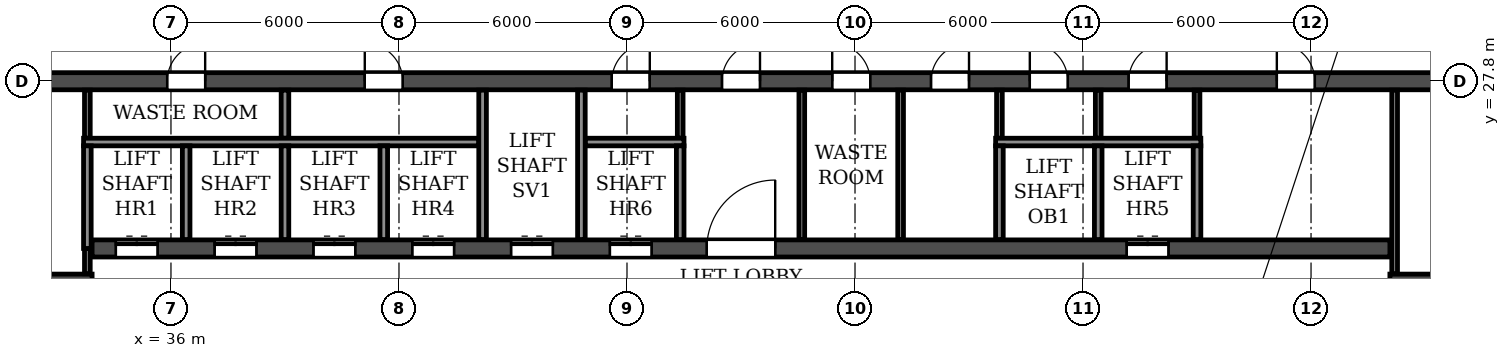
"""IFC4 building model, lengths in metres.
Left out: names, types, materials, properties, quantities, classifications, styles, units other than length and angle.
Written with IfcOpenShell. Run it as: python <this file> out.ifc"""

import sys

from ifc_helpers import new_model, si_unit, direction, frame, frame_2d, origin, place, context, subcontext, project, spatial, rectangle, extrude, element, fill, save


model = new_model("IFC4")
c1 = context("Model", 3, precision=1e-05, world=origin(), true_north=direction((0.0, 1.0)))
c2 = subcontext(c1, "Body", "Model", "MODEL_VIEW")
j1 = project(units=[si_unit("LENGTHUNIT", "METRE"), si_unit("PLANEANGLEUNIT", "RADIAN")], contexts=[c1])
p1 = place(None, origin())
s1 = spatial("IfcSite", under=j1, at=p1, CompositionType="ELEMENT")
p2 = place(p1, origin())
s2 = spatial("IfcBuilding", under=s1, at=p2, CompositionType="ELEMENT")
p3 = place(p2, frame((0.0, 0.0, 142.2)))
s3 = spatial("IfcBuildingStorey", under=s2, at=p3, CompositionType="ELEMENT", Elevation=142.2)
p4 = place(p3, frame((12.2, 27.8, 0.0), z_axis=(0.0, 0.0, 1.0), x_axis=(1.0, 0.0, 0.0)))
e1 = element("IfcWall", 1, at=p4, inside=s3, PredefinedType="SOLIDWALL", context=c2, shape_type="SweptSolid", body=[
    extrude(rectangle(XDim=77.6, YDim=0.45, at=frame_2d((38.8, 0.0))), origin(), (0.0, 0.0, 1.0), 3.07),
])
p5 = place(p4, frame((2.3, 0.0, 0.0)))
e2 = element("IfcOpeningElement", 2, at=p5, cuts=e1, PredefinedType="OPENING", context=c2, shape_type="SweptSolid", body=[
    extrude(rectangle(XDim=1.0, YDim=2.1, at=frame_2d((0.5, 1.05))), frame((0.0, 0.235, 0.0), z_axis=(0.0, -1.0, 0.0), x_axis=(1.0, 0.0, 0.0)), (0.0, 0.0, 1.0), 0.47),
])
p6 = place(p4, frame((6.7, 0.0, 0.0)))
e3 = element("IfcOpeningElement", 3, at=p6, cuts=e1, PredefinedType="OPENING", context=c2, shape_type="SweptSolid", body=[
    extrude(rectangle(XDim=1.0, YDim=2.1, at=frame_2d((0.5, 1.05))), frame((0.0, 0.235, 0.0), z_axis=(0.0, -1.0, 0.0), x_axis=(1.0, 0.0, 0.0)), (0.0, 0.0, 1.0), 0.47),
])
p7 = place(p4, frame((10.05, 0.0, 0.0)))
e4 = element("IfcOpeningElement", 4, at=p7, cuts=e1, PredefinedType="OPENING", context=c2, shape_type="SweptSolid", body=[
    extrude(rectangle(XDim=0.9, YDim=2.1, at=frame_2d((0.45, 1.05))), frame((0.0, 0.235, 0.0), z_axis=(0.0, -1.0, 0.0), x_axis=(1.0, 0.0, 0.0)), (0.0, 0.0, 1.0), 0.47),
])
p8 = place(p4, frame((19.25, 0.0, 0.0)))
e5 = element("IfcOpeningElement", 5, at=p8, cuts=e1, PredefinedType="OPENING", context=c2, shape_type="SweptSolid", body=[
    extrude(rectangle(XDim=0.9, YDim=2.1, at=frame_2d((0.45, 1.05))), frame((0.0, 0.235, 0.0), z_axis=(0.0, -1.0, 0.0), x_axis=(1.0, 0.0, 0.0)), (0.0, 0.0, 1.0), 0.47),
])
p9 = place(p4, frame((23.7, 0.0, 0.0)))
e6 = element("IfcOpeningElement", 6, at=p9, cuts=e1, PredefinedType="OPENING", context=c2, shape_type="SweptSolid", body=[
    extrude(rectangle(XDim=1.0, YDim=2.1, at=frame_2d((0.5, 1.05))), frame((0.0, 0.235, 0.0), z_axis=(0.0, -1.0, 0.0), x_axis=(1.0, 0.0, 0.0)), (0.0, 0.0, 1.0), 0.47),
])
p10 = place(p4, frame((28.9, 0.0, 0.0)))
e7 = element("IfcOpeningElement", 7, at=p10, cuts=e1, PredefinedType="OPENING", context=c2, shape_type="SweptSolid", body=[
    extrude(rectangle(XDim=1.0, YDim=2.1, at=frame_2d((0.5, 1.05))), frame((0.0, 0.235, 0.0), z_axis=(0.0, -1.0, 0.0), x_axis=(1.0, 0.0, 0.0)), (0.0, 0.0, 1.0), 0.47),
])
p11 = place(p4, frame((35.4, 0.0, 0.0)))
e8 = element("IfcOpeningElement", 8, at=p11, cuts=e1, PredefinedType="OPENING", context=c2, shape_type="SweptSolid", body=[
    extrude(rectangle(XDim=1.0, YDim=2.1, at=frame_2d((0.5, 1.05))), frame((0.0, 0.235, 0.0), z_axis=(0.0, -1.0, 0.0), x_axis=(1.0, 0.0, 0.0)), (0.0, 0.0, 1.0), 0.47),
])
p12 = place(p4, frame((38.3, 0.0, 0.0)))
e9 = element("IfcOpeningElement", 9, at=p12, cuts=e1, PredefinedType="OPENING", context=c2, shape_type="SweptSolid", body=[
    extrude(rectangle(XDim=1.0, YDim=2.1, at=frame_2d((0.5, 1.05))), frame((0.0, 0.235, 0.0), z_axis=(0.0, -1.0, 0.0), x_axis=(1.0, 0.0, 0.0)), (0.0, 0.0, 1.0), 0.47),
])
p13 = place(p4, frame((41.2, 0.0, 0.0)))
e10 = element("IfcOpeningElement", 10, at=p13, cuts=e1, PredefinedType="OPENING", context=c2, shape_type="SweptSolid", body=[
    extrude(rectangle(XDim=1.0, YDim=2.1, at=frame_2d((0.5, 1.05))), frame((0.0, 0.235, 0.0), z_axis=(0.0, -1.0, 0.0), x_axis=(1.0, 0.0, 0.0)), (0.0, 0.0, 1.0), 0.47),
])
p14 = place(p4, frame((43.8, 0.0, 0.0)))
e11 = element("IfcOpeningElement", 11, at=p14, cuts=e1, PredefinedType="OPENING", context=c2, shape_type="SweptSolid", body=[
    extrude(rectangle(XDim=1.0, YDim=2.1, at=frame_2d((0.5, 1.05))), frame((0.0, 0.235, 0.0), z_axis=(0.0, -1.0, 0.0), x_axis=(1.0, 0.0, 0.0)), (0.0, 0.0, 1.0), 0.47),
])
p15 = place(p4, frame((46.4, 0.0, 0.0)))
e12 = element("IfcOpeningElement", 12, at=p15, cuts=e1, PredefinedType="OPENING", context=c2, shape_type="SweptSolid", body=[
    extrude(rectangle(XDim=1.0, YDim=2.1, at=frame_2d((0.5, 1.05))), frame((0.0, 0.235, 0.0), z_axis=(0.0, -1.0, 0.0), x_axis=(1.0, 0.0, 0.0)), (0.0, 0.0, 1.0), 0.47),
])
p16 = place(p4, frame((49.0, 0.0, 0.0)))
e13 = element("IfcOpeningElement", 13, at=p16, cuts=e1, PredefinedType="OPENING", context=c2, shape_type="SweptSolid", body=[
    extrude(rectangle(XDim=1.0, YDim=2.1, at=frame_2d((0.5, 1.05))), frame((0.0, 0.235, 0.0), z_axis=(0.0, -1.0, 0.0), x_axis=(1.0, 0.0, 0.0)), (0.0, 0.0, 1.0), 0.47),
])
p17 = place(p4, frame((52.9, 0.0, 0.0)))
e14 = element("IfcOpeningElement", 14, at=p17, cuts=e1, PredefinedType="OPENING", context=c2, shape_type="SweptSolid", body=[
    extrude(rectangle(XDim=1.0, YDim=2.1, at=frame_2d((0.5, 1.05))), frame((0.0, 0.235, 0.0), z_axis=(0.0, -1.0, 0.0), x_axis=(1.0, 0.0, 0.0)), (0.0, 0.0, 1.0), 0.47),
])
p18 = place(p4, frame((57.45, 0.0, 0.0)))
e15 = element("IfcOpeningElement", 15, at=p18, cuts=e1, PredefinedType="OPENING", context=c2, shape_type="SweptSolid", body=[
    extrude(rectangle(XDim=0.9, YDim=2.1, at=frame_2d((0.45, 1.05))), frame((0.0, 0.235, 0.0), z_axis=(0.0, -1.0, 0.0), x_axis=(1.0, 0.0, 0.0)), (0.0, 0.0, 1.0), 0.47),
])
p19 = place(p4, frame((66.65, 0.0, 0.0)))
e16 = element("IfcOpeningElement", 16, at=p19, cuts=e1, PredefinedType="OPENING", context=c2, shape_type="SweptSolid", body=[
    extrude(rectangle(XDim=0.9, YDim=2.1, at=frame_2d((0.45, 1.05))), frame((0.0, 0.235, 0.0), z_axis=(0.0, -1.0, 0.0), x_axis=(1.0, 0.0, 0.0)), (0.0, 0.0, 1.0), 0.47),
])
p20 = place(p4, frame((69.9, 0.0, 0.0)))
e17 = element("IfcOpeningElement", 17, at=p20, cuts=e1, PredefinedType="OPENING", context=c2, shape_type="SweptSolid", body=[
    extrude(rectangle(XDim=1.0, YDim=2.1, at=frame_2d((0.5, 1.05))), frame((0.0, 0.235, 0.0), z_axis=(0.0, -1.0, 0.0), x_axis=(1.0, 0.0, 0.0)), (0.0, 0.0, 1.0), 0.47),
])
p21 = place(p4, frame((74.3, 0.0, 0.0)))
e18 = element("IfcOpeningElement", 18, at=p21, cuts=e1, PredefinedType="OPENING", context=c2, shape_type="SweptSolid", body=[
    extrude(rectangle(XDim=1.0, YDim=2.1, at=frame_2d((0.5, 1.05))), frame((0.0, 0.235, 0.0), z_axis=(0.0, -1.0, 0.0), x_axis=(1.0, 0.0, 0.0)), (0.0, 0.0, 1.0), 0.47),
])
p22 = place(p3, frame((33.925, 23.4, 0.0), z_axis=(0.0, 0.0, 1.0), x_axis=(1.0, 0.0, 0.0)))
e19 = element("IfcWall", 19, at=p22, inside=s3, PredefinedType="SOLIDWALL", context=c2, shape_type="SweptSolid", body=[
    extrude(rectangle(XDim=34.15, YDim=0.45, at=frame_2d((17.075, 0.0))), origin(), (0.0, 0.0, 1.0), 3.07),
])
p23 = place(p22, frame((16.175, 0.0, 0.0)))
e20 = element("IfcOpeningElement", 20, at=p23, cuts=e19, PredefinedType="OPENING", context=c2, shape_type="SweptSolid", body=[
    extrude(rectangle(XDim=1.8, YDim=2.1, at=frame_2d((0.9, 1.05))), frame((0.0, 0.235, 0.0), z_axis=(0.0, -1.0, 0.0), x_axis=(1.0, 0.0, 0.0)), (0.0, 0.0, 1.0), 0.47),
])
p24 = place(p22, frame((0.625, 0.0, 0.0)))
e21 = element("IfcOpeningElement", 21, at=p24, cuts=e19, PredefinedType="OPENING", context=c2, shape_type="SweptSolid", body=[
    extrude(rectangle(XDim=1.1, YDim=2.1, at=frame_2d((0.55, 1.05))), frame((0.0, 0.235, 0.0), z_axis=(0.0, -1.0, 0.0), x_axis=(1.0, 0.0, 0.0)), (0.0, 0.0, 1.0), 0.47),
])
p25 = place(p22, frame((3.225, 0.0, 0.0)))
e22 = element("IfcOpeningElement", 22, at=p25, cuts=e19, PredefinedType="OPENING", context=c2, shape_type="SweptSolid", body=[
    extrude(rectangle(XDim=1.1, YDim=2.1, at=frame_2d((0.55, 1.05))), frame((0.0, 0.235, 0.0), z_axis=(0.0, -1.0, 0.0), x_axis=(1.0, 0.0, 0.0)), (0.0, 0.0, 1.0), 0.47),
])
p26 = place(p22, frame((5.825, 0.0, 0.0)))
e23 = element("IfcOpeningElement", 23, at=p26, cuts=e19, PredefinedType="OPENING", context=c2, shape_type="SweptSolid", body=[
    extrude(rectangle(XDim=1.1, YDim=2.1, at=frame_2d((0.55, 1.05))), frame((0.0, 0.235, 0.0), z_axis=(0.0, -1.0, 0.0), x_axis=(1.0, 0.0, 0.0)), (0.0, 0.0, 1.0), 0.47),
])
p27 = place(p22, frame((8.425, 0.0, 0.0)))
e24 = element("IfcOpeningElement", 24, at=p27, cuts=e19, PredefinedType="OPENING", context=c2, shape_type="SweptSolid", body=[
    extrude(rectangle(XDim=1.1, YDim=2.1, at=frame_2d((0.55, 1.05))), frame((0.0, 0.235, 0.0), z_axis=(0.0, -1.0, 0.0), x_axis=(1.0, 0.0, 0.0)), (0.0, 0.0, 1.0), 0.47),
])
p28 = place(p22, frame((11.025, 0.0, 0.0)))
e25 = element("IfcOpeningElement", 25, at=p28, cuts=e19, PredefinedType="OPENING", context=c2, shape_type="SweptSolid", body=[
    extrude(rectangle(XDim=1.1, YDim=2.1, at=frame_2d((0.55, 1.05))), frame((0.0, 0.235, 0.0), z_axis=(0.0, -1.0, 0.0), x_axis=(1.0, 0.0, 0.0)), (0.0, 0.0, 1.0), 0.47),
])
p29 = place(p22, frame((13.625, 0.0, 0.0)))
e26 = element("IfcOpeningElement", 26, at=p29, cuts=e19, PredefinedType="OPENING", context=c2, shape_type="SweptSolid", body=[
    extrude(rectangle(XDim=1.1, YDim=2.1, at=frame_2d((0.55, 1.05))), frame((0.0, 0.235, 0.0), z_axis=(0.0, -1.0, 0.0), x_axis=(1.0, 0.0, 0.0)), (0.0, 0.0, 1.0), 0.47),
])
p30 = place(p22, frame((27.225, 0.0, 0.0)))
e27 = element("IfcOpeningElement", 27, at=p30, cuts=e19, PredefinedType="OPENING", context=c2, shape_type="SweptSolid", body=[
    extrude(rectangle(XDim=1.1, YDim=2.1, at=frame_2d((0.55, 1.05))), frame((0.0, 0.235, 0.0), z_axis=(0.0, -1.0, 0.0), x_axis=(1.0, 0.0, 0.0)), (0.0, 0.0, 1.0), 0.47),
])
for number, where, z_axis, x_axis in (
    (28, (29.875, 22.6, 0.0), (0.0, 0.0, 1.0), (1.0, 0.0, 0.0)),
    (29, (68.075, 22.6, 0.0), (0.0, 0.0, 1.0), (1.0, 0.0, 0.0)),
):
    element("IfcWall", number, at=place(p3, frame(where, z_axis=z_axis, x_axis=x_axis)), inside=s3, PredefinedType="SOLIDWALL", context=c2, shape_type="SweptSolid", body=[
        extrude(rectangle(XDim=4.05, YDim=0.25, at=frame_2d((2.025, 0.0))), origin(), (0.0, 0.0, 1.0), 3.07),
    ])
p31 = place(p3, frame((49.4, 26.3, 0.0), z_axis=(0.0, 0.0, 1.0), x_axis=(0.0, 1.0, 0.0)))
e30 = element("IfcWall", 30, at=p31, inside=s3, PredefinedType="PARTITIONING", context=c2, shape_type="SweptSolid", body=[
    extrude(rectangle(XDim=1.265, YDim=0.15, at=frame_2d((0.632, 0.0))), origin(), (0.0, 0.0, 1.0), 3.07),
])
for number, where, z_axis, x_axis in (
    (31, (52.6, 23.635, 0.0), (0.0, 0.0, 1.0), (0.0, 1.0, 0.0)),
    (32, (55.2, 23.635, 0.0), (0.0, 0.0, 1.0), (0.0, 1.0, 0.0)),
):
    element("IfcWall", number, at=place(p3, frame(where, z_axis=z_axis, x_axis=x_axis)), inside=s3, PredefinedType="PARTITIONING", context=c2, shape_type="SweptSolid", body=[
        extrude(rectangle(XDim=3.93, YDim=0.15, at=frame_2d((1.965, 0.0))), origin(), (0.0, 0.0, 1.0), 3.07),
    ])
for number, where, z_axis, x_axis in (
    (33, (57.8, 26.3, 0.0), (0.0, 0.0, 1.0), (0.0, 1.0, 0.0)),
    (34, (60.4, 26.3, 0.0), (0.0, 0.0, 1.0), (0.0, 1.0, 0.0)),
    (35, (63.0, 26.3, 0.0), (0.0, 0.0, 1.0), (0.0, 1.0, 0.0)),
):
    element("IfcWall", number, at=place(p3, frame(where, z_axis=z_axis, x_axis=x_axis)), inside=s3, PredefinedType="PARTITIONING", context=c2, shape_type="SweptSolid", body=[
        extrude(rectangle(XDim=1.265, YDim=0.15, at=frame_2d((0.632, 0.0))), origin(), (0.0, 0.0, 1.0), 3.07),
    ])
p32 = place(p3, frame((39.0, 26.3, 0.0), z_axis=(0.0, 0.0, 1.0), x_axis=(0.0, 1.0, 0.0)))
e36 = element("IfcWall", 36, at=p32, inside=s3, PredefinedType="PARTITIONING", context=c2, shape_type="SweptSolid", body=[
    extrude(rectangle(XDim=1.265, YDim=0.2, at=frame_2d((0.632, 0.0))), origin(), (0.0, 0.0, 1.0), 3.07),
])
p33 = place(p3, frame((33.8, 22.735, 0.0), z_axis=(0.0, 0.0, 1.0), x_axis=(0.0, 1.0, 0.0)))
e37 = element("IfcWall", 37, at=p33, inside=s3, PredefinedType="PARTITIONING", context=c2, shape_type="SweptSolid", body=[
    extrude(rectangle(XDim=0.665, YDim=0.15, at=frame_2d((0.333, 0.0))), origin(), (0.0, 0.0, 1.0), 3.07),
])
p34 = place(p3, frame((33.8, 26.3, 0.0), z_axis=(0.0, 0.0, 1.0), x_axis=(0.0, 1.0, 0.0)))
e38 = element("IfcWall", 38, at=p34, inside=s3, PredefinedType="PARTITIONING", context=c2, shape_type="SweptSolid", body=[
    extrude(rectangle(XDim=1.265, YDim=0.15, at=frame_2d((0.632, 0.0))), origin(), (0.0, 0.0, 1.0), 3.07),
])
p35 = place(p3, frame((68.2, 22.735, 0.0), z_axis=(0.0, 0.0, 1.0), x_axis=(0.0, 1.0, 0.0)))
e39 = element("IfcWall", 39, at=p35, inside=s3, PredefinedType="PARTITIONING", context=c2, shape_type="SweptSolid", body=[
    extrude(rectangle(XDim=4.83, YDim=0.15, at=frame_2d((2.415, 0.0))), origin(), (0.0, 0.0, 1.0), 3.07),
])
p36 = place(p3, frame((33.7, 26.2, 0.0), z_axis=(0.0, 0.0, 1.0), x_axis=(1.0, 0.0, 0.0)))
e40 = element("IfcWall", 40, at=p36, inside=s3, PredefinedType="PARTITIONING", context=c2, shape_type="SweptSolid", body=[
    extrude(rectangle(XDim=10.4, YDim=0.2, at=frame_2d((5.2, 0.0))), origin(), (0.0, 0.0, 1.0), 3.07),
])
p37 = place(p3, frame((46.9, 26.2, 0.0), z_axis=(0.0, 0.0, 1.0), x_axis=(1.0, 0.0, 0.0)))
e41 = element("IfcWall", 41, at=p37, inside=s3, PredefinedType="PARTITIONING", context=c2, shape_type="SweptSolid", body=[
    extrude(rectangle(XDim=2.6, YDim=0.2, at=frame_2d((1.3, 0.0))), origin(), (0.0, 0.0, 1.0), 3.07),
])
p38 = place(p3, frame((57.7, 26.2, 0.0), z_axis=(0.0, 0.0, 1.0), x_axis=(1.0, 0.0, 0.0)))
e42 = element("IfcWall", 42, at=p38, inside=s3, PredefinedType="PARTITIONING", context=c2, shape_type="SweptSolid", body=[
    extrude(rectangle(XDim=5.4, YDim=0.2, at=frame_2d((2.7, 0.0))), origin(), (0.0, 0.0, 1.0), 3.07),
])
p39 = place(p3, frame((33.8, 23.4, 0.0), z_axis=(0.0, 0.0, 1.0), x_axis=(0.0, 1.0, 0.0)))
e43 = element("IfcWall", 43, at=p39, inside=s3, PredefinedType="PARTITIONING", context=c2, shape_type="SweptSolid", body=[
    extrude(rectangle(XDim=2.7, YDim=0.2, at=frame_2d((1.35, 0.0))), origin(), (0.0, 0.0, 1.0), 3.07),
])
for number, where, z_axis, x_axis in (
    (44, (36.4, 23.635, 0.0), (0.0, 0.0, 1.0), (0.0, 1.0, 0.0)),
    (45, (39.0, 23.635, 0.0), (0.0, 0.0, 1.0), (0.0, 1.0, 0.0)),
    (46, (41.6, 23.635, 0.0), (0.0, 0.0, 1.0), (0.0, 1.0, 0.0)),
):
    element("IfcWall", number, at=place(p3, frame(where, z_axis=z_axis, x_axis=x_axis)), inside=s3, PredefinedType="PARTITIONING", context=c2, shape_type="SweptSolid", body=[
        extrude(rectangle(XDim=2.465, YDim=0.2, at=frame_2d((1.232, 0.0))), origin(), (0.0, 0.0, 1.0), 3.07),
    ])
for number, where, z_axis, x_axis in (
    (47, (44.2, 23.635, 0.0), (0.0, 0.0, 1.0), (0.0, 1.0, 0.0)),
    (48, (46.8, 23.635, 0.0), (0.0, 0.0, 1.0), (0.0, 1.0, 0.0)),
):
    element("IfcWall", number, at=place(p3, frame(where, z_axis=z_axis, x_axis=x_axis)), inside=s3, PredefinedType="PARTITIONING", context=c2, shape_type="SweptSolid", body=[
        extrude(rectangle(XDim=3.93, YDim=0.2, at=frame_2d((1.965, 0.0))), origin(), (0.0, 0.0, 1.0), 3.07),
    ])
for number, where, z_axis, x_axis in (
    (49, (49.4, 23.635, 0.0), (0.0, 0.0, 1.0), (0.0, 1.0, 0.0)),
    (50, (57.8, 23.635, 0.0), (0.0, 0.0, 1.0), (0.0, 1.0, 0.0)),
    (51, (60.4, 23.635, 0.0), (0.0, 0.0, 1.0), (0.0, 1.0, 0.0)),
    (52, (63.0, 23.635, 0.0), (0.0, 0.0, 1.0), (0.0, 1.0, 0.0)),
):
    element("IfcWall", number, at=place(p3, frame(where, z_axis=z_axis, x_axis=x_axis)), inside=s3, PredefinedType="PARTITIONING", context=c2, shape_type="SweptSolid", body=[
        extrude(rectangle(XDim=2.465, YDim=0.2, at=frame_2d((1.232, 0.0))), origin(), (0.0, 0.0, 1.0), 3.07),
    ])
p40 = place(p9, origin())
e53 = element("IfcDoor", 53, at=p40, inside=s3, OperationType="SINGLE_SWING_RIGHT", PredefinedType="DOOR", context=c2, shape_type="SweptSolid", body=[
    extrude(rectangle(XDim=1.0, YDim=2.1, at=frame_2d((0.5, 1.05))), frame((0.0, 0.025, 0.0), z_axis=(0.0, -1.0, 0.0), x_axis=(1.0, 0.0, 0.0)), (0.0, 0.0, 1.0), 0.05),
])
fill(e6, e53)
p41 = place(p10, origin())
e54 = element("IfcDoor", 54, at=p41, inside=s3, OperationType="SINGLE_SWING_LEFT", PredefinedType="DOOR", context=c2, shape_type="SweptSolid", body=[
    extrude(rectangle(XDim=1.0, YDim=2.1, at=frame_2d((0.5, 1.05))), frame((0.0, 0.025, 0.0), z_axis=(0.0, -1.0, 0.0), x_axis=(1.0, 0.0, 0.0)), (0.0, 0.0, 1.0), 0.05),
])
fill(e7, e54)
p42 = place(p11, origin())
e55 = element("IfcDoor", 55, at=p42, inside=s3, OperationType="SINGLE_SWING_RIGHT", PredefinedType="DOOR", context=c2, shape_type="SweptSolid", body=[
    extrude(rectangle(XDim=1.0, YDim=2.1, at=frame_2d((0.5, 1.05))), frame((0.0, 0.025, 0.0), z_axis=(0.0, -1.0, 0.0), x_axis=(1.0, 0.0, 0.0)), (0.0, 0.0, 1.0), 0.05),
])
fill(e8, e55)
p43 = place(p12, origin())
e56 = element("IfcDoor", 56, at=p43, inside=s3, OperationType="SINGLE_SWING_RIGHT", PredefinedType="DOOR", context=c2, shape_type="SweptSolid", body=[
    extrude(rectangle(XDim=1.0, YDim=2.1, at=frame_2d((0.5, 1.05))), frame((0.0, 0.025, 0.0), z_axis=(0.0, -1.0, 0.0), x_axis=(1.0, 0.0, 0.0)), (0.0, 0.0, 1.0), 0.05),
])
fill(e9, e56)
p44 = place(p13, origin())
e57 = element("IfcDoor", 57, at=p44, inside=s3, OperationType="SINGLE_SWING_LEFT", PredefinedType="DOOR", context=c2, shape_type="SweptSolid", body=[
    extrude(rectangle(XDim=1.0, YDim=2.1, at=frame_2d((0.5, 1.05))), frame((0.0, 0.025, 0.0), z_axis=(0.0, -1.0, 0.0), x_axis=(1.0, 0.0, 0.0)), (0.0, 0.0, 1.0), 0.05),
])
fill(e10, e57)
p45 = place(p14, origin())
e58 = element("IfcDoor", 58, at=p45, inside=s3, OperationType="SINGLE_SWING_RIGHT", PredefinedType="DOOR", context=c2, shape_type="SweptSolid", body=[
    extrude(rectangle(XDim=1.0, YDim=2.1, at=frame_2d((0.5, 1.05))), frame((0.0, 0.025, 0.0), z_axis=(0.0, -1.0, 0.0), x_axis=(1.0, 0.0, 0.0)), (0.0, 0.0, 1.0), 0.05),
])
fill(e11, e58)
p46 = place(p15, origin())
e59 = element("IfcDoor", 59, at=p46, inside=s3, OperationType="SINGLE_SWING_LEFT", PredefinedType="DOOR", context=c2, shape_type="SweptSolid", body=[
    extrude(rectangle(XDim=1.0, YDim=2.1, at=frame_2d((0.5, 1.05))), frame((0.0, 0.025, 0.0), z_axis=(0.0, -1.0, 0.0), x_axis=(1.0, 0.0, 0.0)), (0.0, 0.0, 1.0), 0.05),
])
fill(e12, e59)
p47 = place(p16, origin())
e60 = element("IfcDoor", 60, at=p47, inside=s3, OperationType="SINGLE_SWING_RIGHT", PredefinedType="DOOR", context=c2, shape_type="SweptSolid", body=[
    extrude(rectangle(XDim=1.0, YDim=2.1, at=frame_2d((0.5, 1.05))), frame((0.0, 0.025, 0.0), z_axis=(0.0, -1.0, 0.0), x_axis=(1.0, 0.0, 0.0)), (0.0, 0.0, 1.0), 0.05),
])
fill(e13, e60)
p48 = place(p17, origin())
e61 = element("IfcDoor", 61, at=p48, inside=s3, OperationType="SINGLE_SWING_LEFT", PredefinedType="DOOR", context=c2, shape_type="SweptSolid", body=[
    extrude(rectangle(XDim=1.0, YDim=2.1, at=frame_2d((0.5, 1.05))), frame((0.0, 0.025, 0.0), z_axis=(0.0, -1.0, 0.0), x_axis=(1.0, 0.0, 0.0)), (0.0, 0.0, 1.0), 0.05),
])
fill(e14, e61)
p49 = place(p23, origin())
e62 = element("IfcDoor", 62, at=p49, inside=s3, OperationType="DOUBLE_DOOR_SINGLE_SWING", PredefinedType="DOOR", context=c2, shape_type="SweptSolid", body=[
    extrude(rectangle(XDim=1.8, YDim=2.1, at=frame_2d((0.9, 1.05))), frame((0.0, 0.025, 0.0), z_axis=(0.0, -1.0, 0.0), x_axis=(1.0, 0.0, 0.0)), (0.0, 0.0, 1.0), 0.05),
])
fill(e20, e62)
p50 = place(p24, origin())
e63 = element("IfcDoor", 63, at=p50, inside=s3, OperationType="DOUBLE_DOOR_SLIDING", PredefinedType="DOOR", context=c2, shape_type="SweptSolid", body=[
    extrude(rectangle(XDim=1.1, YDim=2.1, at=frame_2d((0.55, 1.05))), frame((0.0, 0.025, 0.0), z_axis=(0.0, -1.0, 0.0), x_axis=(1.0, 0.0, 0.0)), (0.0, 0.0, 1.0), 0.05),
])
fill(e21, e63)
p51 = place(p25, origin())
e64 = element("IfcDoor", 64, at=p51, inside=s3, OperationType="DOUBLE_DOOR_SLIDING", PredefinedType="DOOR", context=c2, shape_type="SweptSolid", body=[
    extrude(rectangle(XDim=1.1, YDim=2.1, at=frame_2d((0.55, 1.05))), frame((0.0, 0.025, 0.0), z_axis=(0.0, -1.0, 0.0), x_axis=(1.0, 0.0, 0.0)), (0.0, 0.0, 1.0), 0.05),
])
fill(e22, e64)
p52 = place(p26, origin())
e65 = element("IfcDoor", 65, at=p52, inside=s3, OperationType="DOUBLE_DOOR_SLIDING", PredefinedType="DOOR", context=c2, shape_type="SweptSolid", body=[
    extrude(rectangle(XDim=1.1, YDim=2.1, at=frame_2d((0.55, 1.05))), frame((0.0, 0.025, 0.0), z_axis=(0.0, -1.0, 0.0), x_axis=(1.0, 0.0, 0.0)), (0.0, 0.0, 1.0), 0.05),
])
fill(e23, e65)
p53 = place(p27, origin())
e66 = element("IfcDoor", 66, at=p53, inside=s3, OperationType="DOUBLE_DOOR_SLIDING", PredefinedType="DOOR", context=c2, shape_type="SweptSolid", body=[
    extrude(rectangle(XDim=1.1, YDim=2.1, at=frame_2d((0.55, 1.05))), frame((0.0, 0.025, 0.0), z_axis=(0.0, -1.0, 0.0), x_axis=(1.0, 0.0, 0.0)), (0.0, 0.0, 1.0), 0.05),
])
fill(e24, e66)
p54 = place(p28, origin())
e67 = element("IfcDoor", 67, at=p54, inside=s3, OperationType="DOUBLE_DOOR_SLIDING", PredefinedType="DOOR", context=c2, shape_type="SweptSolid", body=[
    extrude(rectangle(XDim=1.1, YDim=2.1, at=frame_2d((0.55, 1.05))), frame((0.0, 0.025, 0.0), z_axis=(0.0, -1.0, 0.0), x_axis=(1.0, 0.0, 0.0)), (0.0, 0.0, 1.0), 0.05),
])
fill(e25, e67)
p55 = place(p29, origin())
e68 = element("IfcDoor", 68, at=p55, inside=s3, OperationType="DOUBLE_DOOR_SLIDING", PredefinedType="DOOR", context=c2, shape_type="SweptSolid", body=[
    extrude(rectangle(XDim=1.1, YDim=2.1, at=frame_2d((0.55, 1.05))), frame((0.0, 0.025, 0.0), z_axis=(0.0, -1.0, 0.0), x_axis=(1.0, 0.0, 0.0)), (0.0, 0.0, 1.0), 0.05),
])
fill(e26, e68)
p56 = place(p30, origin())
e69 = element("IfcDoor", 69, at=p56, inside=s3, OperationType="DOUBLE_DOOR_SLIDING", PredefinedType="DOOR", context=c2, shape_type="SweptSolid", body=[
    extrude(rectangle(XDim=1.1, YDim=2.1, at=frame_2d((0.55, 1.05))), frame((0.0, 0.025, 0.0), z_axis=(0.0, -1.0, 0.0), x_axis=(1.0, 0.0, 0.0)), (0.0, 0.0, 1.0), 0.05),
])
fill(e27, e69)
save(model, sys.argv[1])
